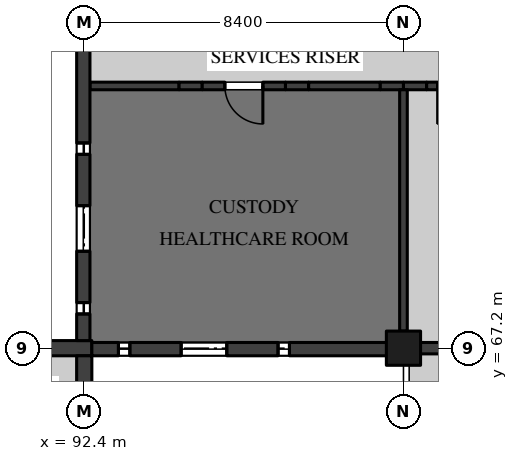
"""IFC4 building model, lengths in metres.
Left out: names, types, materials, properties, quantities, classifications, styles, units other than length and angle.
Written with IfcOpenShell. Run it as: python <this file> out.ifc"""

import sys

from ifc_helpers import new_model, si_unit, direction, frame, frame_2d, origin, origin_2d, place, context, subcontext, project, spatial, rectangle, extrude, element, fill, save


model = new_model("IFC4")
c1 = context("Model", 3, precision=1e-05, world=origin(), true_north=direction((0.0, 1.0)))
c2 = subcontext(c1, "Body", "Model", "MODEL_VIEW")
j1 = project(units=[si_unit("LENGTHUNIT", "METRE"), si_unit("PLANEANGLEUNIT", "RADIAN")], contexts=[c1])
p1 = place(None, origin())
s1 = spatial("IfcSite", under=j1, at=p1, CompositionType="ELEMENT")
p2 = place(p1, origin())
s2 = spatial("IfcBuilding", under=s1, at=p2, CompositionType="ELEMENT")
p3 = place(p2, frame((0.0, 0.0, 5.4)))
s3 = spatial("IfcBuildingStorey", under=s2, at=p3, CompositionType="ELEMENT", Elevation=5.4)
p4 = place(p3, frame((100.8, 67.2, 0.0), z_axis=(0.0, 0.0, 1.0), x_axis=(1.0, 0.0, 0.0)))
e1 = element("IfcColumn", 1, at=p4, inside=s3, PredefinedType="COLUMN", context=c2, shape_type="SweptSolid", body=[
    extrude(rectangle(XDim=0.9, YDim=0.9, at=origin_2d()), origin(), (0.0, 0.0, 1.0), 4.37),
])
p5 = place(p3, frame((83.8, 67.2, 0.0), z_axis=(0.0, 0.0, 1.0), x_axis=(1.0, 0.0, 0.0)))
e2 = element("IfcWall", 2, at=p5, inside=s3, PredefinedType="SHEAR", context=c2, shape_type="SweptSolid", body=[
    extrude(rectangle(XDim=8.8, YDim=0.4, at=frame_2d((4.4, 0.0))), origin(), (0.0, 0.0, 1.0), 4.25),
])
p6 = place(p3, frame((92.4, 59.0, 0.0), z_axis=(0.0, 0.0, 1.0), x_axis=(0.0, 1.0, 0.0)))
e3 = element("IfcWall", 3, at=p6, inside=s3, PredefinedType="SHEAR", context=c2, shape_type="SweptSolid", body=[
    extrude(rectangle(XDim=8.0, YDim=0.4, at=frame_2d((4.0, 0.0))), origin(), (0.0, 0.0, 1.0), 4.25),
])
p7 = place(p3, frame((92.55, 74.1, 0.0), z_axis=(0.0, 0.0, 1.0), x_axis=(1.0, 0.0, 0.0)))
e4 = element("IfcWall", 4, at=p7, inside=s3, PredefinedType="PARTITIONING", context=c2, shape_type="SweptSolid", body=[
    extrude(rectangle(XDim=2.345, YDim=0.2, at=frame_2d((1.172, 0.0))), origin(), (0.0, 0.0, 1.0), 4.37),
])
p8 = place(p3, frame((94.895, 74.1, 0.0), z_axis=(0.0, 0.0, 1.0), x_axis=(1.0, 0.0, 0.0)))
e5 = element("IfcWall", 5, at=p8, inside=s3, PredefinedType="PARTITIONING", context=c2, shape_type="SweptSolid", body=[
    extrude(rectangle(XDim=0.61, YDim=0.2, at=frame_2d((0.305, 0.0))), origin(), (0.0, 0.0, 1.0), 3.895),
])
p9 = place(p3, frame((95.505, 74.1, 0.0), z_axis=(0.0, 0.0, 1.0), x_axis=(1.0, 0.0, 0.0)))
e6 = element("IfcWall", 6, at=p9, inside=s3, PredefinedType="PARTITIONING", context=c2, shape_type="SweptSolid", body=[
    extrude(rectangle(XDim=2.19, YDim=0.2, at=frame_2d((1.095, 0.0))), origin(), (0.0, 0.0, 1.0), 4.37),
])
p10 = place(p9, frame((0.595, 0.0, 0.0)))
e7 = element("IfcOpeningElement", 7, at=p10, cuts=e6, PredefinedType="OPENING", context=c2, shape_type="SweptSolid", body=[
    extrude(rectangle(XDim=1.0, YDim=2.1, at=frame_2d((0.5, 1.05))), frame((0.0, 0.11, 0.0), z_axis=(0.0, -1.0, 0.0), x_axis=(1.0, 0.0, 0.0)), (0.0, 0.0, 1.0), 0.22),
])
p11 = place(p3, frame((97.695, 74.1, 0.0), z_axis=(0.0, 0.0, 1.0), x_axis=(1.0, 0.0, 0.0)))
e8 = element("IfcWall", 8, at=p11, inside=s3, PredefinedType="PARTITIONING", context=c2, shape_type="SweptSolid", body=[
    extrude(rectangle(XDim=0.61, YDim=0.2, at=frame_2d((0.305, 0.0))), origin(), (0.0, 0.0, 1.0), 3.895),
])
p12 = place(p3, frame((98.305, 74.1, 0.0), z_axis=(0.0, 0.0, 1.0), x_axis=(1.0, 0.0, 0.0)))
e9 = element("IfcWall", 9, at=p12, inside=s3, PredefinedType="PARTITIONING", context=c2, shape_type="SweptSolid", body=[
    extrude(rectangle(XDim=1.885, YDim=0.2, at=frame_2d((0.942, 0.0))), origin(), (0.0, 0.0, 1.0), 4.37),
])
p13 = place(p3, frame((100.19, 74.1, 0.0), z_axis=(0.0, 0.0, 1.0), x_axis=(1.0, 0.0, 0.0)))
e10 = element("IfcWall", 10, at=p13, inside=s3, PredefinedType="PARTITIONING", context=c2, shape_type="SweptSolid", body=[
    extrude(rectangle(XDim=0.61, YDim=0.2, at=frame_2d((0.305, 0.0))), origin(), (0.0, 0.0, 1.0), 3.746),
])
p14 = place(p3, frame((100.8, 74.1, 0.0), z_axis=(0.0, 0.0, 1.0), x_axis=(1.0, 0.0, 0.0)))
e11 = element("IfcWall", 11, at=p14, inside=s3, PredefinedType="PARTITIONING", context=c2, shape_type="SweptSolid", body=[
    extrude(rectangle(XDim=0.61, YDim=0.2, at=frame_2d((0.305, 0.0))), origin(), (0.0, 0.0, 1.0), 3.746),
])
p15 = place(p3, frame((101.41, 74.1, 0.0), z_axis=(0.0, 0.0, 1.0), x_axis=(1.0, 0.0, 0.0)))
e12 = element("IfcWall", 12, at=p15, inside=s3, PredefinedType="PARTITIONING", context=c2, shape_type="SweptSolid", body=[
    extrude(rectangle(XDim=1.885, YDim=0.2, at=frame_2d((0.942, 0.0))), origin(), (0.0, 0.0, 1.0), 4.37),
])
p16 = place(p15, frame((0.29, 0.0, 0.0)))
e13 = element("IfcOpeningElement", 13, at=p16, cuts=e12, PredefinedType="OPENING", context=c2, shape_type="SweptSolid", body=[
    extrude(rectangle(XDim=1.0, YDim=2.1, at=frame_2d((0.5, 1.05))), frame((0.0, 0.11, 0.0), z_axis=(0.0, -1.0, 0.0), x_axis=(1.0, 0.0, 0.0)), (0.0, 0.0, 1.0), 0.22),
])
p17 = place(p3, frame((100.8, 67.65, 0.0), z_axis=(0.0, 0.0, 1.0), x_axis=(0.0, 1.0, 0.0)))
e14 = element("IfcWall", 14, at=p17, inside=s3, PredefinedType="PARTITIONING", context=c2, shape_type="SweptSolid", body=[
    extrude(rectangle(XDim=6.35, YDim=0.2, at=frame_2d((3.175, 0.0))), origin(), (0.0, 0.0, 1.0), 3.746),
])
p18 = place(p3, frame((92.375, 75.4, 0.0), z_axis=(0.0, 0.0, 1.0), x_axis=(0.0, -1.0, 0.0)))
e15 = element("IfcWall", 15, at=p18, inside=s3, PredefinedType="SOLIDWALL", context=c2, shape_type="SweptSolid", body=[
    extrude(rectangle(XDim=8.0, YDim=0.35, at=frame_2d((4.0, 0.0))), origin(), (0.0, 0.0, 1.0), 3.746),
])
p19 = place(p18, frame((2.8, 0.0, 1.5)))
e16 = element("IfcOpeningElement", 16, at=p19, cuts=e15, PredefinedType="OPENING", context=c2, shape_type="SweptSolid", body=[
    extrude(rectangle(XDim=0.3, YDim=1.5, at=frame_2d((0.15, 0.75))), frame((0.0, 0.185, 0.0), z_axis=(0.0, -1.0, 0.0), x_axis=(1.0, 0.0, 0.0)), (0.0, 0.0, 1.0), 0.37),
])
p20 = place(p18, frame((4.45, 0.0, 1.5)))
e17 = element("IfcOpeningElement", 17, at=p20, cuts=e15, PredefinedType="OPENING", context=c2, shape_type="SweptSolid", body=[
    extrude(rectangle(XDim=1.2, YDim=1.5, at=frame_2d((0.6, 0.75))), frame((0.0, 0.185, 0.0), z_axis=(0.0, -1.0, 0.0), x_axis=(1.0, 0.0, 0.0)), (0.0, 0.0, 1.0), 0.37),
])
p21 = place(p18, frame((7.0, 0.0, 1.5)))
e18 = element("IfcOpeningElement", 18, at=p21, cuts=e15, PredefinedType="OPENING", context=c2, shape_type="SweptSolid", body=[
    extrude(rectangle(XDim=0.3, YDim=1.5, at=frame_2d((0.15, 0.75))), frame((0.0, 0.185, 0.0), z_axis=(0.0, -1.0, 0.0), x_axis=(1.0, 0.0, 0.0)), (0.0, 0.0, 1.0), 0.37),
])
p22 = place(p3, frame((92.6, 67.175, 0.0), z_axis=(0.0, 0.0, 1.0), x_axis=(1.0, 0.0, 0.0)))
e19 = element("IfcWall", 19, at=p22, inside=s3, PredefinedType="SOLIDWALL", context=c2, shape_type="SweptSolid", body=[
    extrude(rectangle(XDim=7.77, YDim=0.35, at=frame_2d((3.885, 0.0))), origin(), (0.0, 0.0, 1.0), 3.746),
])
p23 = place(p22, frame((0.7, 0.0, 1.5)))
e20 = element("IfcOpeningElement", 20, at=p23, cuts=e19, PredefinedType="OPENING", context=c2, shape_type="SweptSolid", body=[
    extrude(rectangle(XDim=0.3, YDim=1.5, at=frame_2d((0.15, 0.75))), frame((0.0, 0.185, 0.0), z_axis=(0.0, -1.0, 0.0), x_axis=(1.0, 0.0, 0.0)), (0.0, 0.0, 1.0), 0.37),
])
p24 = place(p22, frame((2.35, 0.0, 1.5)))
e21 = element("IfcOpeningElement", 21, at=p24, cuts=e19, PredefinedType="OPENING", context=c2, shape_type="SweptSolid", body=[
    extrude(rectangle(XDim=1.2, YDim=1.5, at=frame_2d((0.6, 0.75))), frame((0.0, 0.185, 0.0), z_axis=(0.0, -1.0, 0.0), x_axis=(1.0, 0.0, 0.0)), (0.0, 0.0, 1.0), 0.37),
])
p25 = place(p22, frame((4.9, 0.0, 1.5)))
e22 = element("IfcOpeningElement", 22, at=p25, cuts=e19, PredefinedType="OPENING", context=c2, shape_type="SweptSolid", body=[
    extrude(rectangle(XDim=0.3, YDim=1.5, at=frame_2d((0.15, 0.75))), frame((0.0, 0.185, 0.0), z_axis=(0.0, -1.0, 0.0), x_axis=(1.0, 0.0, 0.0)), (0.0, 0.0, 1.0), 0.37),
])
p26 = place(p3, frame((109.0, 67.2, 0.0), z_axis=(0.0, 0.0, 1.0), x_axis=(-1.0, 0.0, 0.0)))
e23 = element("IfcWall", 23, at=p26, inside=s3, PredefinedType="SOLIDWALL", context=c2, shape_type="SweptSolid", body=[
    extrude(rectangle(XDim=7.77, YDim=0.3, at=frame_2d((3.885, 0.0))), origin(), (0.0, 0.0, 1.0), 3.746),
])
p27 = place(p10, frame((1.0, 0.0, 0.0), z_axis=(0.0, 0.0, 1.0), x_axis=(-1.0, 0.0, 0.0)))
e24 = element("IfcDoor", 24, at=p27, inside=s3, OperationType="SINGLE_SWING_RIGHT", PredefinedType="DOOR", context=c2, shape_type="SweptSolid", body=[
    extrude(rectangle(XDim=1.0, YDim=2.1, at=frame_2d((0.5, 1.05))), frame((0.0, 0.045, 0.0), z_axis=(0.0, -1.0, 0.0), x_axis=(1.0, 0.0, 0.0)), (0.0, 0.0, 1.0), 0.09),
])
fill(e7, e24)
p28 = place(p19, origin())
e25 = element("IfcWindow", 25, at=p28, inside=s3, PartitioningType="SINGLE_PANEL", PredefinedType="WINDOW", context=c2, shape_type="SweptSolid", body=[
    extrude(rectangle(XDim=0.3, YDim=1.5, at=frame_2d((0.15, 0.75))), frame((0.0, 0.05, 0.0), z_axis=(0.0, -1.0, 0.0), x_axis=(1.0, 0.0, 0.0)), (0.0, 0.0, 1.0), 0.1),
])
fill(e16, e25)
p29 = place(p20, origin())
e26 = element("IfcWindow", 26, at=p29, inside=s3, PartitioningType="SINGLE_PANEL", PredefinedType="WINDOW", context=c2, shape_type="SweptSolid", body=[
    extrude(rectangle(XDim=1.2, YDim=1.5, at=frame_2d((0.6, 0.75))), frame((0.0, 0.04, 0.0), z_axis=(0.0, -1.0, 0.0), x_axis=(1.0, 0.0, 0.0)), (0.0, 0.0, 1.0), 0.08),
])
fill(e17, e26)
p30 = place(p21, origin())
e27 = element("IfcWindow", 27, at=p30, inside=s3, PartitioningType="SINGLE_PANEL", PredefinedType="WINDOW", context=c2, shape_type="SweptSolid", body=[
    extrude(rectangle(XDim=0.3, YDim=1.5, at=frame_2d((0.15, 0.75))), frame((0.0, 0.05, 0.0), z_axis=(0.0, -1.0, 0.0), x_axis=(1.0, 0.0, 0.0)), (0.0, 0.0, 1.0), 0.1),
])
fill(e18, e27)
p31 = place(p23, origin())
e28 = element("IfcWindow", 28, at=p31, inside=s3, PartitioningType="SINGLE_PANEL", PredefinedType="WINDOW", context=c2, shape_type="SweptSolid", body=[
    extrude(rectangle(XDim=0.3, YDim=1.5, at=frame_2d((0.15, 0.75))), frame((0.0, 0.05, 0.0), z_axis=(0.0, -1.0, 0.0), x_axis=(1.0, 0.0, 0.0)), (0.0, 0.0, 1.0), 0.1),
])
fill(e20, e28)
p32 = place(p24, origin())
e29 = element("IfcWindow", 29, at=p32, inside=s3, PartitioningType="SINGLE_PANEL", PredefinedType="WINDOW", context=c2, shape_type="SweptSolid", body=[
    extrude(rectangle(XDim=1.2, YDim=1.5, at=frame_2d((0.6, 0.75))), frame((0.0, 0.04, 0.0), z_axis=(0.0, -1.0, 0.0), x_axis=(1.0, 0.0, 0.0)), (0.0, 0.0, 1.0), 0.08),
])
fill(e21, e29)
p33 = place(p25, origin())
e30 = element("IfcWindow", 30, at=p33, inside=s3, PartitioningType="SINGLE_PANEL", PredefinedType="WINDOW", context=c2, shape_type="SweptSolid", body=[
    extrude(rectangle(XDim=0.3, YDim=1.5, at=frame_2d((0.15, 0.75))), frame((0.0, 0.05, 0.0), z_axis=(0.0, -1.0, 0.0), x_axis=(1.0, 0.0, 0.0)), (0.0, 0.0, 1.0), 0.1),
])
fill(e22, e30)
save(model, sys.argv[1])
